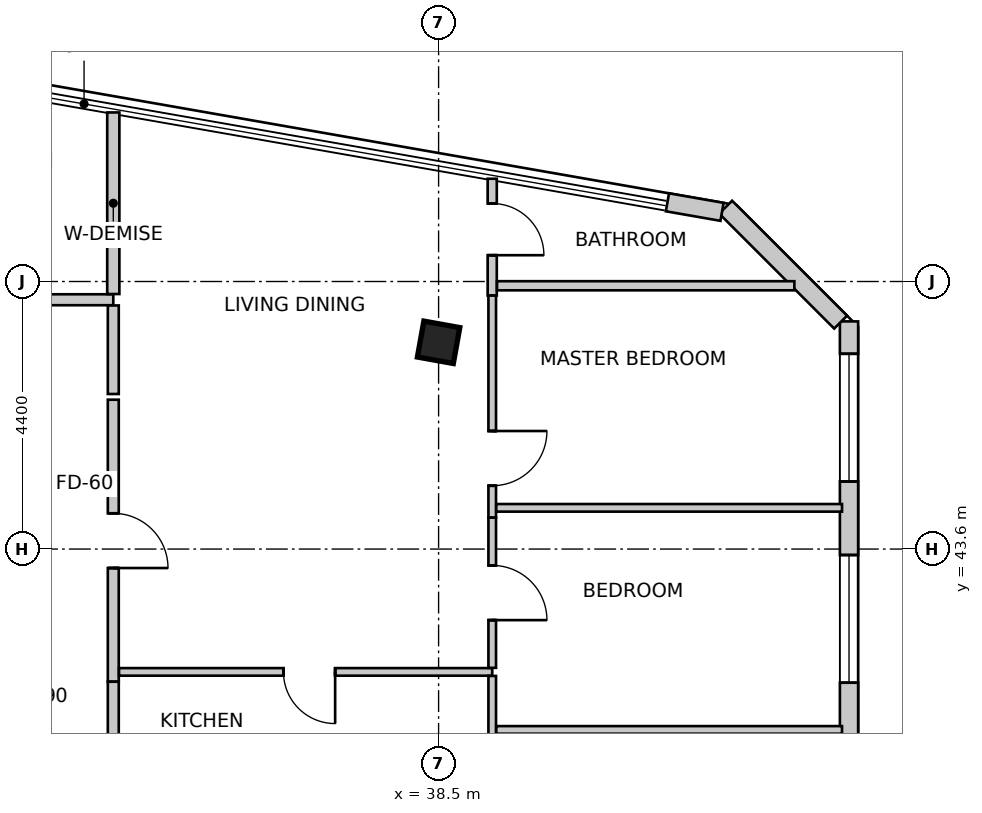
"""IFC4 building model, lengths in metres.
Left out: names, types, materials, properties, quantities, classifications, styles, units other than length and angle.
Written with IfcOpenShell. Run it as: python <this file> out.ifc"""

import sys

from ifc_helpers import new_model, si_unit, direction, frame, frame_2d, origin, origin_2d, place, context, subcontext, project, spatial, rectangle, extrude, source, transform, mapped, element, fill, save


model = new_model("IFC4")
c1 = context("Model", 3, precision=1e-05, world=origin(), true_north=direction((0.0, 1.0)))
c2 = subcontext(c1, "Body", "Model", "MODEL_VIEW")
j1 = project(units=[si_unit("LENGTHUNIT", "METRE"), si_unit("PLANEANGLEUNIT", "RADIAN")], contexts=[c1])
p1 = place(None, origin())
s1 = spatial("IfcSite", under=j1, at=p1, CompositionType="ELEMENT")
p2 = place(p1, origin())
s2 = spatial("IfcBuilding", under=s1, at=p2, CompositionType="ELEMENT")
p3 = place(p2, frame((0.0, 0.0, 270.9)))
s3 = spatial("IfcBuildingStorey", under=s2, at=p3, CompositionType="ELEMENT", Elevation=270.9)
m1 = source(origin(), c2, "Body", "SweptSolid", [
    extrude(rectangle(XDim=0.6, YDim=0.6, at=origin_2d()), origin(), (0.0, 0.0, 1.0), 3.6),
])
p4 = place(p3, frame((38.5, 47.0, 0.0), z_axis=(0.0, 0.0, 1.0), x_axis=(0.984195607969, -0.17708474032, 0.0)))
e1 = element("IfcColumn", 1, at=p4, inside=s3, PredefinedType="COLUMN", context=c2, shape_type="MappedRepresentation", body=[
    mapped(m1, transform((0.0, 0.0, 0.0), scale=1.0)),
])
p5 = place(p3, frame((45.25, 36.813, 0.0), z_axis=(0.0, 0.0, 1.0), x_axis=(0.0, 1.0, 0.0)))
e2 = element("IfcWall", 2, at=p5, inside=s3, PredefinedType="SOLIDWALL", context=c2, shape_type="SweptSolid", body=[
    extrude(rectangle(XDim=10.531, YDim=0.3, at=frame_2d((5.265, 0.0))), origin(), (0.0, 0.0, 1.0), 3.35),
])
m2 = source(origin(), c2, "Body", "SweptSolid", [
    extrude(rectangle(XDim=2.1, YDim=2.0, at=frame_2d((1.05, 1.0))), frame((0.0, 0.16, 0.0), z_axis=(0.0, -1.0, 0.0), x_axis=(1.0, 0.0, 0.0)), (0.0, 0.0, 1.0), 0.32),
])
p6 = place(p5, frame((0.936, 0.0, 0.85)))
e3 = element("IfcOpeningElement", 3, at=p6, cuts=e2, PredefinedType="OPENING", context=c2, shape_type="MappedRepresentation", body=[
    mapped(m2, transform((0.0, 0.0, 0.0), scale=1.0)),
])
p7 = place(p5, frame((4.589, 0.0, 0.85)))
e4 = element("IfcOpeningElement", 4, at=p7, cuts=e2, PredefinedType="OPENING", context=c2, shape_type="MappedRepresentation", body=[
    mapped(m2, transform((0.0, 0.0, 0.0), scale=1.0)),
])
p8 = place(p5, frame((7.898, 0.0, 0.85)))
e5 = element("IfcOpeningElement", 5, at=p8, cuts=e2, PredefinedType="OPENING", context=c2, shape_type="MappedRepresentation", body=[
    mapped(m2, transform((0.0, 0.0, 0.0), scale=1.0)),
])
p9 = place(p3, frame((45.112, 47.332, 0.0), z_axis=(0.0, 0.0, 1.0), x_axis=(-0.707106781187, 0.707106781187, 0.0)))
e6 = element("IfcWall", 6, at=p9, inside=s3, PredefinedType="SOLIDWALL", context=c2, shape_type="SweptSolid", body=[
    extrude(rectangle(XDim=2.674, YDim=0.3, at=frame_2d((1.337, 0.0))), origin(), (0.0, 0.0, 1.0), 3.35),
])
p10 = place(p3, frame((43.161, 49.146, 0.0), z_axis=(0.0, 0.0, 1.0), x_axis=(-0.985052066521, 0.172256861238, 0.0)))
e7 = element("IfcWall", 7, at=p10, inside=s3, PredefinedType="SOLIDWALL", context=c2, shape_type="SweptSolid", body=[
    extrude(rectangle(XDim=0.911, YDim=0.3, at=frame_2d((0.456, 0.0))), origin(), (0.0, 0.0, 1.0), 3.35),
])
p11 = place(p3, frame((28.362, 47.7, 0.0), z_axis=(0.0, 0.0, 1.0), x_axis=(1.0, 0.0, 0.0)))
e8 = element("IfcWall", 8, at=p11, inside=s3, PredefinedType="PARTITIONING", context=c2, shape_type="SweptSolid", body=[
    extrude(rectangle(XDim=4.788, YDim=0.18, at=frame_2d((2.394, 0.0))), origin(), (0.0, 0.0, 1.0), 2.788),
])
m3 = source(origin(), c2, "Body", "SweptSolid", [
    extrude(rectangle(XDim=0.85, YDim=2.15, at=frame_2d((0.425, 1.075))), frame((0.0, 0.1, 0.0), z_axis=(0.0, -1.0, 0.0), x_axis=(1.0, 0.0, 0.0)), (0.0, 0.0, 1.0), 0.2),
])
p12 = place(p11, frame((0.401, 0.0, 0.0)))
e9 = element("IfcOpeningElement", 9, at=p12, cuts=e8, PredefinedType="OPENING", context=c2, shape_type="MappedRepresentation", body=[
    mapped(m3, transform((0.0, 0.0, 0.0), scale=1.0)),
])
p13 = place(p3, frame((33.15, 47.606, 0.0), z_axis=(0.0, 0.0, 1.0), x_axis=(0.0, -1.0, 0.0)))
e10 = element("IfcWall", 10, at=p13, inside=s3, PredefinedType="PARTITIONING", context=c2, shape_type="SweptSolid", body=[
    extrude(rectangle(XDim=1.456, YDim=0.18, at=frame_2d((0.728, 0.0))), origin(), (0.0, 0.0, 1.0), 3.35),
])
p14 = place(p3, frame((33.15, 46.056, 0.0), z_axis=(0.0, 0.0, 1.0), x_axis=(0.0, -1.0, 0.0)))
e11 = element("IfcWall", 11, at=p14, inside=s3, PredefinedType="PARTITIONING", context=c2, shape_type="SweptSolid", body=[
    extrude(rectangle(XDim=4.636, YDim=0.18, at=frame_2d((2.318, 0.0))), origin(), (0.0, 0.0, 1.0), 2.788),
])
m4 = source(origin(), c2, "Body", "SweptSolid", [
    extrude(rectangle(XDim=0.9, YDim=2.15, at=frame_2d((0.45, 1.075))), frame((0.0, 0.1, 0.0), z_axis=(0.0, -1.0, 0.0), x_axis=(1.0, 0.0, 0.0)), (0.0, 0.0, 1.0), 0.2),
])
p15 = place(p14, frame((1.868, 0.0, 0.0)))
e12 = element("IfcOpeningElement", 12, at=p15, cuts=e11, PredefinedType="OPENING", context=c2, shape_type="MappedRepresentation", body=[
    mapped(m4, transform((0.0, 0.0, 0.0), scale=1.0)),
])
p16 = place(p3, frame((33.15, 41.418, 0.0), z_axis=(0.0, 0.0, 1.0), x_axis=(0.0, -1.0, 0.0)))
e13 = element("IfcWall", 13, at=p16, inside=s3, PredefinedType="PARTITIONING", context=c2, shape_type="SweptSolid", body=[
    extrude(rectangle(XDim=2.564, YDim=0.18, at=frame_2d((1.282, 0.0))), origin(), (0.0, 0.0, 1.0), 3.35),
])
p17 = place(p3, frame((33.15, 50.78, 0.0), z_axis=(0.0, 0.0, 1.0), x_axis=(0.0, -1.0, 0.0)))
e14 = element("IfcWall", 14, at=p17, inside=s3, PredefinedType="PARTITIONING", context=c2, shape_type="SweptSolid", body=[
    extrude(rectangle(XDim=2.986, YDim=0.2, at=frame_2d((1.493, 0.0))), origin(), (0.0, 0.0, 1.0), 2.642),
])
p18 = place(p3, frame((39.382, 41.58, 0.0), z_axis=(0.0, 0.0, 1.0), x_axis=(-1.0, 0.0, 0.0)))
e15 = element("IfcWall", 15, at=p18, inside=s3, PredefinedType="PARTITIONING", context=c2, shape_type="SweptSolid", body=[
    extrude(rectangle(XDim=6.138, YDim=0.125, at=frame_2d((3.069, 0.0))), origin(), (0.0, 0.0, 1.0), 2.935),
])
m5 = source(origin(), c2, "Body", "SweptSolid", [
    extrude(rectangle(XDim=0.85, YDim=2.15, at=frame_2d((0.425, 1.075))), frame((0.0, 0.073, 0.0), z_axis=(0.0, -1.0, 0.0), x_axis=(1.0, 0.0, 0.0)), (0.0, 0.0, 1.0), 0.145),
])
p19 = place(p18, frame((2.583, 0.0, 0.0)))
e16 = element("IfcOpeningElement", 16, at=p19, cuts=e15, PredefinedType="OPENING", context=c2, shape_type="MappedRepresentation", body=[
    mapped(m5, transform((0.0, 0.0, 0.0), scale=1.0)),
])
p20 = place(p3, frame((39.382, 49.69, 0.0), z_axis=(0.0, 0.0, 1.0), x_axis=(0.0, -1.0, 0.0)))
e17 = element("IfcWall", 17, at=p20, inside=s3, PredefinedType="PARTITIONING", context=c2, shape_type="SweptSolid", body=[
    extrude(rectangle(XDim=1.92, YDim=0.15, at=frame_2d((0.96, 0.0))), origin(), (0.0, 0.0, 1.0), 3.35),
])
m6 = source(origin(), c2, "Body", "SweptSolid", [
    extrude(rectangle(XDim=0.85, YDim=2.15, at=frame_2d((0.425, 1.075))), frame((0.0, 0.085, 0.0), z_axis=(0.0, -1.0, 0.0), x_axis=(1.0, 0.0, 0.0)), (0.0, 0.0, 1.0), 0.17),
])
p21 = place(p20, frame((0.407, 0.0, 0.0)))
e18 = element("IfcOpeningElement", 18, at=p21, cuts=e17, PredefinedType="OPENING", context=c2, shape_type="MappedRepresentation", body=[
    mapped(m6, transform((0.0, 0.0, 0.0), scale=1.0)),
])
p22 = place(p3, frame((39.382, 47.768, 0.0), z_axis=(0.0, 0.0, 1.0), x_axis=(0.0, -1.0, 0.0)))
e19 = element("IfcWall", 19, at=p22, inside=s3, PredefinedType="PARTITIONING", context=c2, shape_type="SweptSolid", body=[
    extrude(rectangle(XDim=3.65, YDim=0.125, at=frame_2d((1.825, 0.0))), origin(), (0.0, 0.0, 1.0), 3.35),
])
m7 = source(origin(), c2, "Body", "SweptSolid", [
    extrude(rectangle(XDim=0.9, YDim=2.15, at=frame_2d((0.45, 1.075))), frame((0.0, 0.073, 0.0), z_axis=(0.0, -1.0, 0.0), x_axis=(1.0, 0.0, 0.0)), (0.0, 0.0, 1.0), 0.145),
])
p23 = place(p22, frame((2.227, 0.0, 0.0)))
e20 = element("IfcOpeningElement", 20, at=p23, cuts=e19, PredefinedType="OPENING", context=c2, shape_type="MappedRepresentation", body=[
    mapped(m7, transform((0.0, 0.0, 0.0), scale=1.0)),
])
p24 = place(p3, frame((39.382, 44.116, 0.0), z_axis=(0.0, 0.0, 1.0), x_axis=(0.0, -1.0, 0.0)))
e21 = element("IfcWall", 21, at=p24, inside=s3, PredefinedType="PARTITIONING", context=c2, shape_type="SweptSolid", body=[
    extrude(rectangle(XDim=2.469, YDim=0.125, at=frame_2d((1.235, 0.0))), origin(), (0.0, 0.0, 1.0), 3.35),
])
p25 = place(p24, frame((0.785, 0.0, 0.0)))
e22 = element("IfcOpeningElement", 22, at=p25, cuts=e21, PredefinedType="OPENING", context=c2, shape_type="MappedRepresentation", body=[
    mapped(m7, transform((0.0, 0.0, 0.0), scale=1.0)),
])
p26 = place(p3, frame((39.382, 41.513, 0.0), z_axis=(0.0, 0.0, 1.0), x_axis=(0.0, -1.0, 0.0)))
e23 = element("IfcWall", 23, at=p26, inside=s3, PredefinedType="PARTITIONING", context=c2, shape_type="SweptSolid", body=[
    extrude(rectangle(XDim=1.047, YDim=0.125, at=frame_2d((0.524, 0.0))), origin(), (0.0, 0.0, 1.0), 3.35),
])
p27 = place(p3, frame((44.351, 47.93, 0.0), z_axis=(0.0, 0.0, 1.0), x_axis=(-1.0, 0.0, 0.0)))
e24 = element("IfcWall", 24, at=p27, inside=s3, PredefinedType="PARTITIONING", context=c2, shape_type="SweptSolid", body=[
    extrude(rectangle(XDim=4.89, YDim=0.15, at=frame_2d((2.445, 0.0))), origin(), (0.0, 0.0, 1.0), 3.35),
])
for number, where, z_axis, x_axis in (
    (25, (45.135, 44.278, 0.0), (0.0, 0.0, 1.0), (-1.0, 0.0, 0.0)),
    (26, (45.135, 40.626, 0.0), (0.0, 0.0, 1.0), (-1.0, 0.0, 0.0)),
):
    element("IfcWall", number, at=place(p3, frame(where, z_axis=z_axis, x_axis=x_axis)), inside=s3, PredefinedType="PARTITIONING", context=c2, shape_type="SweptSolid", body=[
        extrude(rectangle(XDim=5.687, YDim=0.125, at=frame_2d((2.843, 0.0))), origin(), (0.0, 0.0, 1.0), 3.35),
    ])
m8 = source(origin(), c2, "Body", "SweptSolid", [
    extrude(rectangle(XDim=2.1, YDim=2.0, at=frame_2d((1.05, 1.0))), frame((0.0, -0.015, 0.0), z_axis=(0.0, -1.0, 0.0), x_axis=(1.0, 0.0, 0.0)), (0.0, 0.0, 1.0), 0.06),
])
p28 = place(p7, origin())
e27 = element("IfcWindow", 27, at=p28, inside=s3, PartitioningType="SINGLE_PANEL", PredefinedType="WINDOW", context=c2, shape_type="MappedRepresentation", body=[
    mapped(m8, transform((0.0, 0.0, 0.0), scale=1.0)),
])
fill(e4, e27)
p29 = place(p8, origin())
e28 = element("IfcWindow", 28, at=p29, inside=s3, PartitioningType="SINGLE_PANEL", PredefinedType="WINDOW", context=c2, shape_type="MappedRepresentation", body=[
    mapped(m8, transform((0.0, 0.0, 0.0), scale=1.0)),
])
fill(e5, e28)
m9 = source(origin(), c2, "Body", "SweptSolid", [
    extrude(rectangle(XDim=0.9, YDim=2.15, at=frame_2d((0.45, 1.075))), frame((0.0, 0.025, 0.0), z_axis=(0.0, -1.0, 0.0), x_axis=(1.0, 0.0, 0.0)), (0.0, 0.0, 1.0), 0.05),
])
p30 = place(p15, origin())
e29 = element("IfcDoor", 29, at=p30, inside=s3, OperationType="SINGLE_SWING_RIGHT", PredefinedType="DOOR", context=c2, shape_type="MappedRepresentation", body=[
    mapped(m9, transform((0.0, 0.0, 0.0), scale=1.0)),
])
fill(e12, e29)
m10 = source(origin(), c2, "Body", "SweptSolid", [
    extrude(rectangle(XDim=0.85, YDim=2.15, at=frame_2d((0.425, 1.075))), frame((0.0, 0.025, 0.0), z_axis=(0.0, -1.0, 0.0), x_axis=(1.0, 0.0, 0.0)), (0.0, 0.0, 1.0), 0.05),
])
p31 = place(p19, origin())
e30 = element("IfcDoor", 30, at=p31, inside=s3, OperationType="SINGLE_SWING_LEFT", PredefinedType="DOOR", context=c2, shape_type="MappedRepresentation", body=[
    mapped(m10, transform((0.0, 0.0, 0.0), scale=1.0)),
])
fill(e16, e30)
p32 = place(p21, origin())
e31 = element("IfcDoor", 31, at=p32, inside=s3, OperationType="SINGLE_SWING_RIGHT", PredefinedType="DOOR", context=c2, shape_type="MappedRepresentation", body=[
    mapped(m10, transform((0.0, 0.0, 0.0), scale=1.0)),
])
fill(e18, e31)
m11 = source(origin(), c2, "Body", "SweptSolid", [
    extrude(rectangle(XDim=0.9, YDim=2.15, at=frame_2d((0.45, 1.075))), frame((0.0, 0.025, 0.0), z_axis=(0.0, -1.0, 0.0), x_axis=(1.0, 0.0, 0.0)), (0.0, 0.0, 1.0), 0.05),
])
p33 = place(p23, origin())
e32 = element("IfcDoor", 32, at=p33, inside=s3, OperationType="SINGLE_SWING_LEFT", PredefinedType="DOOR", context=c2, shape_type="MappedRepresentation", body=[
    mapped(m11, transform((0.0, 0.0, 0.0), scale=1.0)),
])
fill(e20, e32)
p34 = place(p25, origin())
e33 = element("IfcDoor", 33, at=p34, inside=s3, OperationType="SINGLE_SWING_RIGHT", PredefinedType="DOOR", context=c2, shape_type="MappedRepresentation", body=[
    mapped(m11, transform((0.0, 0.0, 0.0), scale=1.0)),
])
fill(e22, e33)
save(model, sys.argv[1])
